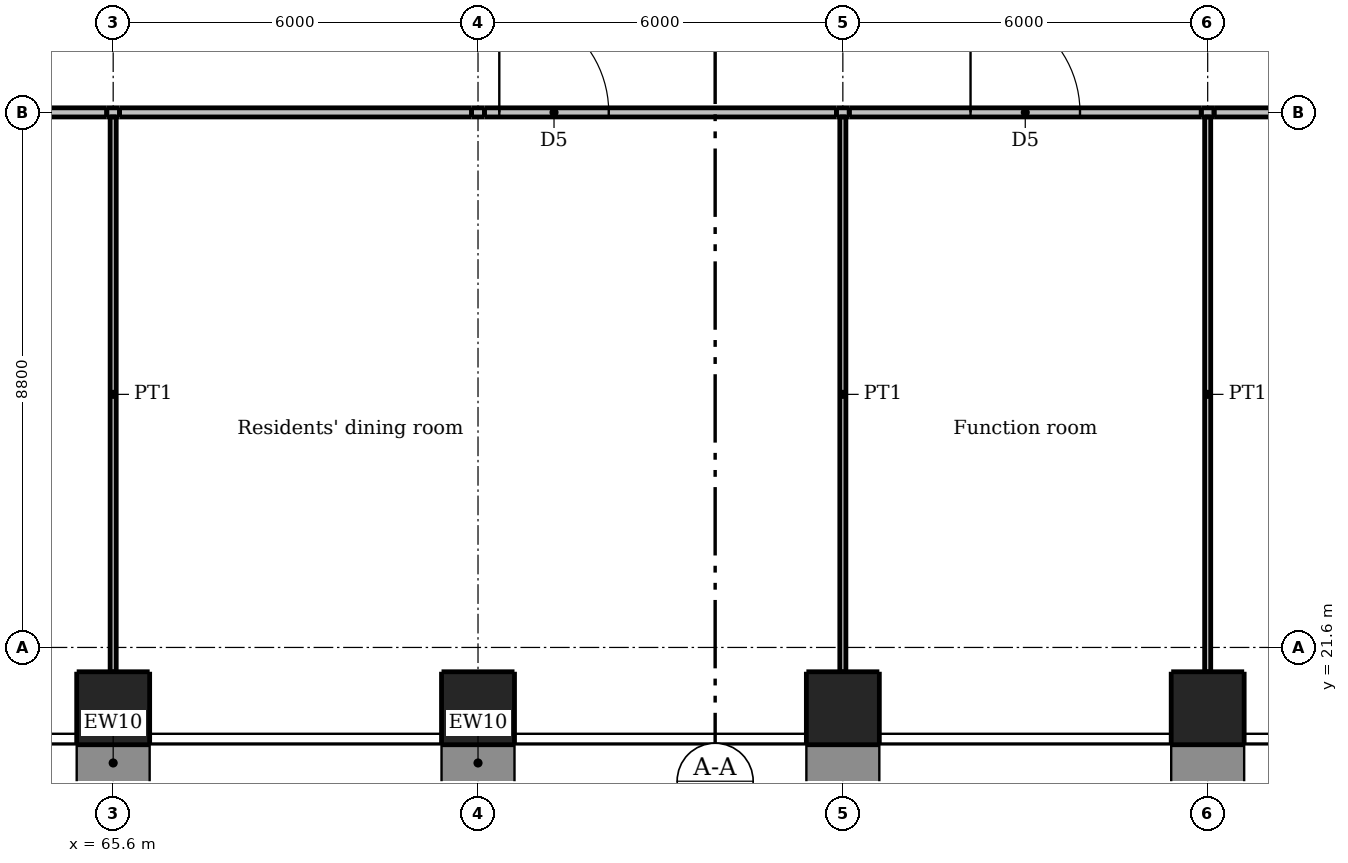
"""IFC4 building model, lengths in metres.
Left out: names, types, materials, properties, quantities, classifications, styles, units other than length and angle.
Written with IfcOpenShell. Run it as: python <this file> out.ifc"""

import sys

from ifc_helpers import new_model, si_unit, direction, frame, frame_2d, origin, origin_2d, place, context, subcontext, project, spatial, rectangle, extrude, element, fill, save


model = new_model("IFC4")
c1 = context("Model", 3, precision=1e-05, world=origin(), true_north=direction((0.0, 1.0)))
c2 = subcontext(c1, "Body", "Model", "MODEL_VIEW")
j1 = project(units=[si_unit("LENGTHUNIT", "METRE"), si_unit("PLANEANGLEUNIT", "RADIAN")], contexts=[c1])
p1 = place(None, origin())
s1 = spatial("IfcSite", under=j1, at=p1, CompositionType="ELEMENT")
p2 = place(p1, origin())
s2 = spatial("IfcBuilding", under=s1, at=p2, CompositionType="ELEMENT")
p3 = place(p2, frame((0.0, 0.0, 5.5)))
s3 = spatial("IfcBuildingStorey", under=s2, at=p3, CompositionType="ELEMENT", Elevation=5.5)
for number, where, z_axis, x_axis in (
    (1, (65.6, 20.6, 0.0), (0.0, 0.0, 1.0), (1.0, 0.0, 0.0)),
    (2, (71.6, 20.6, 0.0), (0.0, 0.0, 1.0), (1.0, 0.0, 0.0)),
    (3, (77.6, 20.6, 0.0), (0.0, 0.0, 1.0), (1.0, 0.0, 0.0)),
    (4, (83.6, 20.6, 0.0), (0.0, 0.0, 1.0), (1.0, 0.0, 0.0)),
):
    element("IfcColumn", number, at=place(p3, frame(where, z_axis=z_axis, x_axis=x_axis)), inside=s3, PredefinedType="COLUMN", context=c2, shape_type="SweptSolid", body=[
        extrude(rectangle(XDim=1.2, YDim=1.2, at=origin_2d()), origin(), (0.0, 0.0, 1.0), 4.2),
    ])
p4 = place(p3, frame((59.705, 30.4, 0.0), z_axis=(0.0, 0.0, 1.0), x_axis=(1.0, 0.0, 0.0)))
e5 = element("IfcWall", 5, at=p4, inside=s3, PredefinedType="PARTITIONING", context=c2, shape_type="SweptSolid", body=[
    extrude(rectangle(XDim=5.789, YDim=0.15, at=frame_2d((2.895, 0.0))), origin(), (0.0, 0.0, 1.0), 4.2),
])
p5 = place(p4, frame((1.995, 0.0, 0.0)))
e6 = element("IfcOpeningElement", 6, at=p5, cuts=e5, PredefinedType="OPENING", context=c2, shape_type="SweptSolid", body=[
    extrude(rectangle(XDim=1.8, YDim=2.1, at=frame_2d((0.9, 1.05))), frame((0.0, 0.085, 0.0), z_axis=(0.0, -1.0, 0.0), x_axis=(1.0, 0.0, 0.0)), (0.0, 0.0, 1.0), 0.17),
])
p6 = place(p3, frame((65.495, 30.4, 0.0), z_axis=(0.0, 0.0, 1.0), x_axis=(1.0, 0.0, 0.0)))
e7 = element("IfcWall", 7, at=p6, inside=s3, PredefinedType="PARTITIONING", context=c2, shape_type="SweptSolid", body=[
    extrude(rectangle(XDim=0.211, YDim=0.15, at=frame_2d((0.105, 0.0))), origin(), (0.0, 0.0, 1.0), 3.66),
])
p7 = place(p3, frame((65.705, 30.4, 0.0), z_axis=(0.0, 0.0, 1.0), x_axis=(1.0, 0.0, 0.0)))
e8 = element("IfcWall", 8, at=p7, inside=s3, PredefinedType="PARTITIONING", context=c2, shape_type="SweptSolid", body=[
    extrude(rectangle(XDim=5.789, YDim=0.15, at=frame_2d((2.895, 0.0))), origin(), (0.0, 0.0, 1.0), 4.2),
])
p8 = place(p3, frame((71.495, 30.4, 0.0), z_axis=(0.0, 0.0, 1.0), x_axis=(1.0, 0.0, 0.0)))
e9 = element("IfcWall", 9, at=p8, inside=s3, PredefinedType="PARTITIONING", context=c2, shape_type="SweptSolid", body=[
    extrude(rectangle(XDim=0.211, YDim=0.15, at=frame_2d((0.105, 0.0))), origin(), (0.0, 0.0, 1.0), 3.66),
])
p9 = place(p3, frame((71.705, 30.4, 0.0), z_axis=(0.0, 0.0, 1.0), x_axis=(1.0, 0.0, 0.0)))
e10 = element("IfcWall", 10, at=p9, inside=s3, PredefinedType="PARTITIONING", context=c2, shape_type="SweptSolid", body=[
    extrude(rectangle(XDim=5.789, YDim=0.15, at=frame_2d((2.895, 0.0))), origin(), (0.0, 0.0, 1.0), 4.2),
])
p10 = place(p9, frame((0.245, 0.0, 0.0)))
e11 = element("IfcOpeningElement", 11, at=p10, cuts=e10, PredefinedType="OPENING", context=c2, shape_type="SweptSolid", body=[
    extrude(rectangle(XDim=1.8, YDim=2.1, at=frame_2d((0.9, 1.05))), frame((0.0, 0.085, 0.0), z_axis=(0.0, -1.0, 0.0), x_axis=(1.0, 0.0, 0.0)), (0.0, 0.0, 1.0), 0.17),
])
p11 = place(p3, frame((77.495, 30.4, 0.0), z_axis=(0.0, 0.0, 1.0), x_axis=(1.0, 0.0, 0.0)))
e12 = element("IfcWall", 12, at=p11, inside=s3, PredefinedType="PARTITIONING", context=c2, shape_type="SweptSolid", body=[
    extrude(rectangle(XDim=0.211, YDim=0.15, at=frame_2d((0.105, 0.0))), origin(), (0.0, 0.0, 1.0), 3.66),
])
p12 = place(p3, frame((77.705, 30.4, 0.0), z_axis=(0.0, 0.0, 1.0), x_axis=(1.0, 0.0, 0.0)))
e13 = element("IfcWall", 13, at=p12, inside=s3, PredefinedType="PARTITIONING", context=c2, shape_type="SweptSolid", body=[
    extrude(rectangle(XDim=5.789, YDim=0.15, at=frame_2d((2.895, 0.0))), origin(), (0.0, 0.0, 1.0), 4.2),
])
p13 = place(p12, frame((1.995, 0.0, 0.0)))
e14 = element("IfcOpeningElement", 14, at=p13, cuts=e13, PredefinedType="OPENING", context=c2, shape_type="SweptSolid", body=[
    extrude(rectangle(XDim=1.8, YDim=2.1, at=frame_2d((0.9, 1.05))), frame((0.0, 0.085, 0.0), z_axis=(0.0, -1.0, 0.0), x_axis=(1.0, 0.0, 0.0)), (0.0, 0.0, 1.0), 0.17),
])
p14 = place(p3, frame((83.495, 30.4, 0.0), z_axis=(0.0, 0.0, 1.0), x_axis=(1.0, 0.0, 0.0)))
e15 = element("IfcWall", 15, at=p14, inside=s3, PredefinedType="PARTITIONING", context=c2, shape_type="SweptSolid", body=[
    extrude(rectangle(XDim=0.211, YDim=0.15, at=frame_2d((0.105, 0.0))), origin(), (0.0, 0.0, 1.0), 3.66),
])
p15 = place(p3, frame((83.705, 30.4, 0.0), z_axis=(0.0, 0.0, 1.0), x_axis=(1.0, 0.0, 0.0)))
e16 = element("IfcWall", 16, at=p15, inside=s3, PredefinedType="PARTITIONING", context=c2, shape_type="SweptSolid", body=[
    extrude(rectangle(XDim=5.789, YDim=0.15, at=frame_2d((2.895, 0.0))), origin(), (0.0, 0.0, 1.0), 4.2),
])
for number, where, z_axis, x_axis in (
    (17, (65.6, 21.2, 0.0), (0.0, 0.0, 1.0), (0.0, 1.0, 0.0)),
    (18, (77.6, 21.2, 0.0), (0.0, 0.0, 1.0), (0.0, 1.0, 0.0)),
    (19, (83.6, 21.2, 0.0), (0.0, 0.0, 1.0), (0.0, 1.0, 0.0)),
):
    element("IfcWall", number, at=place(p3, frame(where, z_axis=z_axis, x_axis=x_axis)), inside=s3, PredefinedType="PARTITIONING", context=c2, shape_type="SweptSolid", body=[
        extrude(rectangle(XDim=9.125, YDim=0.1, at=frame_2d((4.562, 0.0))), origin(), (0.0, 0.0, 1.0), 3.66),
    ])
p16 = place(p10, origin())
e20 = element("IfcDoor", 20, at=p16, inside=s3, OperationType="DOUBLE_DOOR_SINGLE_SWING", PredefinedType="DOOR", context=c2, shape_type="SweptSolid", body=[
    extrude(rectangle(XDim=1.8, YDim=2.1, at=frame_2d((0.9, 1.05))), frame((0.0, 0.025, 0.0), z_axis=(0.0, -1.0, 0.0), x_axis=(1.0, 0.0, 0.0)), (0.0, 0.0, 1.0), 0.05),
])
fill(e11, e20)
p17 = place(p13, origin())
e21 = element("IfcDoor", 21, at=p17, inside=s3, OperationType="DOUBLE_DOOR_SINGLE_SWING", PredefinedType="DOOR", context=c2, shape_type="SweptSolid", body=[
    extrude(rectangle(XDim=1.8, YDim=2.1, at=frame_2d((0.9, 1.05))), frame((0.0, 0.025, 0.0), z_axis=(0.0, -1.0, 0.0), x_axis=(1.0, 0.0, 0.0)), (0.0, 0.0, 1.0), 0.05),
])
fill(e14, e21)
save(model, sys.argv[1])
